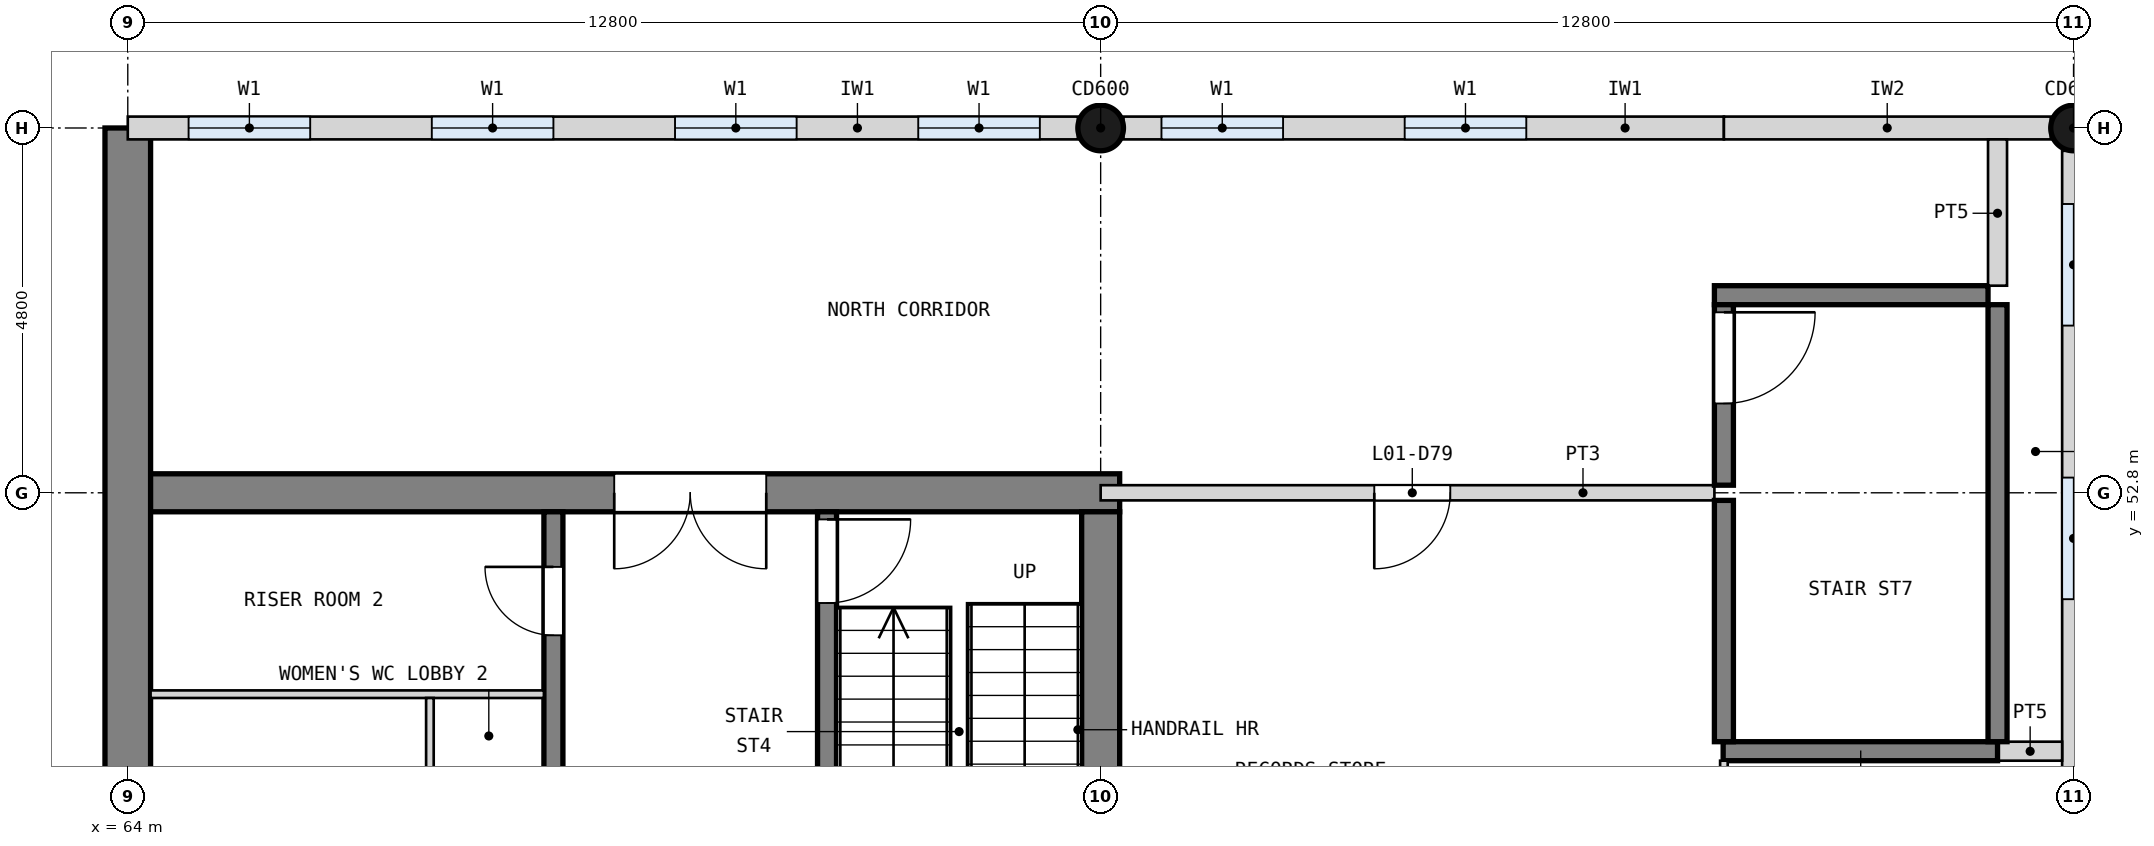
"""IFC4 building model, lengths in metres.
Left out: names, types, materials, properties, quantities, classifications, styles, units other than length and angle.
Written with IfcOpenShell. Run it as: python <this file> out.ifc"""

import sys

from ifc_helpers import new_model, si_unit, direction, frame, frame_2d, origin, origin_2d, place, context, subcontext, project, spatial, rectangle, circle, extrude, element, fill, save


model = new_model("IFC4")
c1 = context("Model", 3, precision=1e-05, world=origin(), true_north=direction((0.0, 1.0)))
c2 = subcontext(c1, "Body", "Model", "MODEL_VIEW")
j1 = project(units=[si_unit("LENGTHUNIT", "METRE"), si_unit("PLANEANGLEUNIT", "RADIAN")], contexts=[c1])
p1 = place(None, origin())
s1 = spatial("IfcSite", under=j1, at=p1, CompositionType="ELEMENT")
p2 = place(p1, origin())
s2 = spatial("IfcBuilding", under=s1, at=p2, CompositionType="ELEMENT")
p3 = place(p2, frame((0.0, 0.0, 4.2)))
s3 = spatial("IfcBuildingStorey", under=s2, at=p3, CompositionType="ELEMENT", Elevation=4.2)
p4 = place(p3, frame((63.75, 52.8, 0.0), z_axis=(0.0, 0.0, 1.0), x_axis=(1.0, 0.0, 0.0)))
e1 = element("IfcWall", 1, at=p4, inside=s3, PredefinedType="SHEAR", context=c2, shape_type="SweptSolid", body=[
    extrude(rectangle(XDim=13.3, YDim=0.5, at=frame_2d((6.65, 0.0))), origin(), (0.0, 0.0, 1.0), 4.2),
])
p5 = place(p4, frame((6.65, 0.0, 0.0)))
e2 = element("IfcOpeningElement", 2, at=p5, cuts=e1, PredefinedType="OPENING", context=c2, shape_type="SweptSolid", body=[
    extrude(rectangle(XDim=2.0, YDim=2.1, at=frame_2d((1.0, 1.05))), frame((0.0, 0.26, 0.0), z_axis=(0.0, -1.0, 0.0), x_axis=(1.0, 0.0, 0.0)), (0.0, 0.0, 1.0), 0.52),
])
p6 = place(p3, frame((76.8, 33.85, 0.0), z_axis=(0.0, 0.0, 1.0), x_axis=(0.0, 1.0, 0.0)))
e3 = element("IfcWall", 3, at=p6, inside=s3, PredefinedType="SHEAR", context=c2, shape_type="SweptSolid", body=[
    extrude(rectangle(XDim=18.7, YDim=0.5, at=frame_2d((9.35, 0.0))), origin(), (0.0, 0.0, 1.0), 4.2),
])
p7 = place(p3, frame((64.0, 28.8, 0.0), z_axis=(0.0, 0.0, 1.0), x_axis=(0.0, 1.0, 0.0)))
e4 = element("IfcWall", 4, at=p7, inside=s3, PredefinedType="SHEAR", context=c2, shape_type="SweptSolid", body=[
    extrude(rectangle(XDim=28.8, YDim=0.6, at=frame_2d((14.4, 0.0))), origin(), (0.0, 0.0, 1.0), 4.2),
])
for number, where, z_axis, x_axis in (
    (5, (89.6, 57.6, 0.0), (0.0, 0.0, 1.0), (1.0, 0.0, 0.0)),
    (6, (76.8, 57.6, 0.0), (0.0, 0.0, 1.0), (1.0, 0.0, 0.0)),
):
    element("IfcColumn", number, at=place(p3, frame(where, z_axis=z_axis, x_axis=x_axis)), inside=s3, PredefinedType="COLUMN", context=c2, shape_type="SweptSolid", body=[
        extrude(circle(Radius=0.3, at=origin_2d()), origin(), (0.0, 0.0, 1.0), 4.2),
    ])
p8 = place(p3, frame((64.0, 57.6, 0.0), z_axis=(0.0, 0.0, 1.0), x_axis=(1.0, 0.0, 0.0)))
e7 = element("IfcWall", 7, at=p8, inside=s3, PredefinedType="SOLIDWALL", context=c2, shape_type="SweptSolid", body=[
    extrude(rectangle(XDim=12.5, YDim=0.3, at=frame_2d((6.25, 0.0))), origin(), (0.0, 0.0, 1.0), 3.0),
])
p9 = place(p8, frame((0.8, 0.0, 1.0)))
e8 = element("IfcOpeningElement", 8, at=p9, cuts=e7, PredefinedType="OPENING", context=c2, shape_type="SweptSolid", body=[
    extrude(rectangle(XDim=1.6, YDim=1.8, at=frame_2d((0.8, 0.9))), frame((0.0, 0.16, 0.0), z_axis=(0.0, -1.0, 0.0), x_axis=(1.0, 0.0, 0.0)), (0.0, 0.0, 1.0), 0.32),
])
p10 = place(p8, frame((4.0, 0.0, 1.0)))
e9 = element("IfcOpeningElement", 9, at=p10, cuts=e7, PredefinedType="OPENING", context=c2, shape_type="SweptSolid", body=[
    extrude(rectangle(XDim=1.6, YDim=1.8, at=frame_2d((0.8, 0.9))), frame((0.0, 0.16, 0.0), z_axis=(0.0, -1.0, 0.0), x_axis=(1.0, 0.0, 0.0)), (0.0, 0.0, 1.0), 0.32),
])
p11 = place(p8, frame((7.2, 0.0, 1.0)))
e10 = element("IfcOpeningElement", 10, at=p11, cuts=e7, PredefinedType="OPENING", context=c2, shape_type="SweptSolid", body=[
    extrude(rectangle(XDim=1.6, YDim=1.8, at=frame_2d((0.8, 0.9))), frame((0.0, 0.16, 0.0), z_axis=(0.0, -1.0, 0.0), x_axis=(1.0, 0.0, 0.0)), (0.0, 0.0, 1.0), 0.32),
])
p12 = place(p8, frame((10.4, 0.0, 1.0)))
e11 = element("IfcOpeningElement", 11, at=p12, cuts=e7, PredefinedType="OPENING", context=c2, shape_type="SweptSolid", body=[
    extrude(rectangle(XDim=1.6, YDim=1.8, at=frame_2d((0.8, 0.9))), frame((0.0, 0.16, 0.0), z_axis=(0.0, -1.0, 0.0), x_axis=(1.0, 0.0, 0.0)), (0.0, 0.0, 1.0), 0.32),
])
p13 = place(p3, frame((77.1, 57.6, 0.0), z_axis=(0.0, 0.0, 1.0), x_axis=(1.0, 0.0, 0.0)))
e12 = element("IfcWall", 12, at=p13, inside=s3, PredefinedType="SOLIDWALL", context=c2, shape_type="SweptSolid", body=[
    extrude(rectangle(XDim=7.9, YDim=0.3, at=frame_2d((3.95, 0.0))), origin(), (0.0, 0.0, 1.0), 3.0),
])
p14 = place(p13, frame((0.5, 0.0, 1.0)))
e13 = element("IfcOpeningElement", 13, at=p14, cuts=e12, PredefinedType="OPENING", context=c2, shape_type="SweptSolid", body=[
    extrude(rectangle(XDim=1.6, YDim=1.8, at=frame_2d((0.8, 0.9))), frame((0.0, 0.16, 0.0), z_axis=(0.0, -1.0, 0.0), x_axis=(1.0, 0.0, 0.0)), (0.0, 0.0, 1.0), 0.32),
])
p15 = place(p13, frame((3.7, 0.0, 1.0)))
e14 = element("IfcOpeningElement", 14, at=p15, cuts=e12, PredefinedType="OPENING", context=c2, shape_type="SweptSolid", body=[
    extrude(rectangle(XDim=1.6, YDim=1.8, at=frame_2d((0.8, 0.9))), frame((0.0, 0.16, 0.0), z_axis=(0.0, -1.0, 0.0), x_axis=(1.0, 0.0, 0.0)), (0.0, 0.0, 1.0), 0.32),
])
p16 = place(p3, frame((85.0, 57.6, 0.0), z_axis=(0.0, 0.0, 1.0), x_axis=(1.0, 0.0, 0.0)))
e15 = element("IfcWall", 15, at=p16, inside=s3, PredefinedType="SOLIDWALL", context=c2, shape_type="SweptSolid", body=[
    extrude(rectangle(XDim=4.3, YDim=0.3, at=frame_2d((2.15, 0.0))), origin(), (0.0, 0.0, 1.0), 3.0),
])
p17 = place(p3, frame((89.6, 43.5, 0.0), z_axis=(0.0, 0.0, 1.0), x_axis=(0.0, 1.0, 0.0)))
e16 = element("IfcWall", 16, at=p17, inside=s3, PredefinedType="SOLIDWALL", context=c2, shape_type="SweptSolid", body=[
    extrude(rectangle(XDim=13.8, YDim=0.3, at=frame_2d((6.9, 0.0))), origin(), (0.0, 0.0, 1.0), 2.9),
])
p18 = place(p17, frame((0.7, 0.0, 1.0)))
e17 = element("IfcOpeningElement", 17, at=p18, cuts=e16, PredefinedType="OPENING", context=c2, shape_type="SweptSolid", body=[
    extrude(rectangle(XDim=1.6, YDim=1.8, at=frame_2d((0.8, 0.9))), frame((0.0, 0.16, 0.0), z_axis=(0.0, -1.0, 0.0), x_axis=(1.0, 0.0, 0.0)), (0.0, 0.0, 1.0), 0.32),
])
p19 = place(p17, frame((7.9, 0.0, 1.0)))
e18 = element("IfcOpeningElement", 18, at=p19, cuts=e16, PredefinedType="OPENING", context=c2, shape_type="SweptSolid", body=[
    extrude(rectangle(XDim=1.6, YDim=1.8, at=frame_2d((0.8, 0.9))), frame((0.0, 0.16, 0.0), z_axis=(0.0, -1.0, 0.0), x_axis=(1.0, 0.0, 0.0)), (0.0, 0.0, 1.0), 0.32),
])
p20 = place(p17, frame((11.5, 0.0, 1.0)))
e19 = element("IfcOpeningElement", 19, at=p20, cuts=e16, PredefinedType="OPENING", context=c2, shape_type="SweptSolid", body=[
    extrude(rectangle(XDim=1.6, YDim=1.8, at=frame_2d((0.8, 0.9))), frame((0.0, 0.16, 0.0), z_axis=(0.0, -1.0, 0.0), x_axis=(1.0, 0.0, 0.0)), (0.0, 0.0, 1.0), 0.32),
])
p21 = place(p3, frame((73.2, 46.475, 0.0), z_axis=(0.0, 0.0, 1.0), x_axis=(0.0, 1.0, 0.0)))
e20 = element("IfcWall", 20, at=p21, inside=s3, PredefinedType="SOLIDWALL", context=c2, shape_type="SweptSolid", body=[
    extrude(rectangle(XDim=6.075, YDim=0.25, at=frame_2d((3.038, 0.0))), origin(), (0.0, 0.0, 1.0), 3.9),
])
p22 = place(p21, frame((4.875, 0.0, 0.0)))
e21 = element("IfcOpeningElement", 21, at=p22, cuts=e20, PredefinedType="OPENING", context=c2, shape_type="SweptSolid", body=[
    extrude(rectangle(XDim=1.1, YDim=2.1, at=frame_2d((0.55, 1.05))), frame((0.0, 0.135, 0.0), z_axis=(0.0, -1.0, 0.0), x_axis=(1.0, 0.0, 0.0)), (0.0, 0.0, 1.0), 0.27),
])
p23 = place(p3, frame((69.6, 46.475, 0.0), z_axis=(0.0, 0.0, 1.0), x_axis=(0.0, 1.0, 0.0)))
e22 = element("IfcWall", 22, at=p23, inside=s3, PredefinedType="SOLIDWALL", context=c2, shape_type="SweptSolid", body=[
    extrude(rectangle(XDim=6.075, YDim=0.25, at=frame_2d((3.038, 0.0))), origin(), (0.0, 0.0, 1.0), 3.9),
])
p24 = place(p23, frame((1.312, 0.0, 0.0)))
e23 = element("IfcOpeningElement", 23, at=p24, cuts=e22, PredefinedType="OPENING", context=c2, shape_type="SweptSolid", body=[
    extrude(rectangle(XDim=1.0, YDim=2.1, at=frame_2d((0.5, 1.05))), frame((0.0, 0.135, 0.0), z_axis=(0.0, -1.0, 0.0), x_axis=(1.0, 0.0, 0.0)), (0.0, 0.0, 1.0), 0.27),
])
p25 = place(p23, frame((4.45, 0.0, 0.0)))
e24 = element("IfcOpeningElement", 24, at=p25, cuts=e22, PredefinedType="OPENING", context=c2, shape_type="SweptSolid", body=[
    extrude(rectangle(XDim=0.9, YDim=2.1, at=frame_2d((0.45, 1.05))), frame((0.0, 0.135, 0.0), z_axis=(0.0, -1.0, 0.0), x_axis=(1.0, 0.0, 0.0)), (0.0, 0.0, 1.0), 0.27),
])
p26 = place(p3, frame((69.475, 50.15, 0.0), z_axis=(0.0, 0.0, 1.0), x_axis=(-1.0, 0.0, 0.0)))
e25 = element("IfcWall", 25, at=p26, inside=s3, PredefinedType="PARTITIONING", context=c2, shape_type="SweptSolid", body=[
    extrude(rectangle(XDim=5.175, YDim=0.1, at=frame_2d((2.587, 0.0))), origin(), (0.0, 0.0, 1.0), 3.9),
])
p27 = place(p3, frame((67.975, 46.475, 0.0), z_axis=(0.0, 0.0, 1.0), x_axis=(0.0, 1.0, 0.0)))
e26 = element("IfcWall", 26, at=p27, inside=s3, PredefinedType="PARTITIONING", context=c2, shape_type="SweptSolid", body=[
    extrude(rectangle(XDim=3.625, YDim=0.1, at=frame_2d((1.812, 0.0))), origin(), (0.0, 0.0, 1.0), 3.9),
])
p28 = place(p27, frame((1.363, 0.0, 0.0)))
e27 = element("IfcOpeningElement", 27, at=p28, cuts=e26, PredefinedType="OPENING", context=c2, shape_type="SweptSolid", body=[
    extrude(rectangle(XDim=0.9, YDim=2.1, at=frame_2d((0.45, 1.05))), frame((0.0, 0.06, 0.0), z_axis=(0.0, -1.0, 0.0), x_axis=(1.0, 0.0, 0.0)), (0.0, 0.0, 1.0), 0.12),
])
p29 = place(p3, frame((89.45, 49.4, 0.0), z_axis=(0.0, 0.0, 1.0), x_axis=(-1.0, 0.0, 0.0)))
e28 = element("IfcWall", 28, at=p29, inside=s3, PredefinedType="PARTITIONING", context=c2, shape_type="SweptSolid", body=[
    extrude(rectangle(XDim=0.85, YDim=0.25, at=frame_2d((0.425, 0.0))), origin(), (0.0, 0.0, 1.0), 3.9),
])
p30 = place(p3, frame((88.6, 49.4, 0.0), z_axis=(0.0, 0.0, 1.0), x_axis=(-1.0, 0.0, 0.0)))
e29 = element("IfcWall", 29, at=p30, inside=s3, PredefinedType="SHEAR", context=c2, shape_type="SweptSolid", body=[
    extrude(rectangle(XDim=3.61, YDim=0.25, at=frame_2d((1.805, 0.0))), origin(), (0.0, 0.0, 1.0), 3.9),
])
p31 = place(p3, frame((84.875, 52.8, 0.0), z_axis=(0.0, 0.0, 1.0), x_axis=(-1.0, 0.0, 0.0)))
e30 = element("IfcWall", 30, at=p31, inside=s3, PredefinedType="PARTITIONING", context=c2, shape_type="SweptSolid", body=[
    extrude(rectangle(XDim=8.075, YDim=0.2, at=frame_2d((4.038, 0.0))), origin(), (0.0, 0.0, 1.0), 3.9),
])
p32 = place(p31, frame((3.475, 0.0, 0.0)))
e31 = element("IfcOpeningElement", 31, at=p32, cuts=e30, PredefinedType="OPENING", context=c2, shape_type="SweptSolid", body=[
    extrude(rectangle(XDim=1.0, YDim=2.1, at=frame_2d((0.5, 1.05))), frame((0.0, 0.11, 0.0), z_axis=(0.0, -1.0, 0.0), x_axis=(1.0, 0.0, 0.0)), (0.0, 0.0, 1.0), 0.22),
])
p33 = place(p3, frame((88.475, 55.4, 0.0), z_axis=(0.0, 0.0, 1.0), x_axis=(-1.0, 0.0, 0.0)))
e32 = element("IfcWall", 32, at=p33, inside=s3, PredefinedType="SHEAR", context=c2, shape_type="SweptSolid", body=[
    extrude(rectangle(XDim=3.6, YDim=0.25, at=frame_2d((1.8, 0.0))), origin(), (0.0, 0.0, 1.0), 3.9),
])
p34 = place(p3, frame((88.6, 49.525, 0.0), z_axis=(0.0, 0.0, 1.0), x_axis=(0.0, 1.0, 0.0)))
e33 = element("IfcWall", 33, at=p34, inside=s3, PredefinedType="SHEAR", context=c2, shape_type="SweptSolid", body=[
    extrude(rectangle(XDim=5.75, YDim=0.25, at=frame_2d((2.875, 0.0))), origin(), (0.0, 0.0, 1.0), 3.9),
])
p35 = place(p3, frame((88.6, 55.525, 0.0), z_axis=(0.0, 0.0, 1.0), x_axis=(0.0, 1.0, 0.0)))
e34 = element("IfcWall", 34, at=p35, inside=s3, PredefinedType="PARTITIONING", context=c2, shape_type="SweptSolid", body=[
    extrude(rectangle(XDim=1.925, YDim=0.25, at=frame_2d((0.962, 0.0))), origin(), (0.0, 0.0, 1.0), 3.9),
])
p36 = place(p3, frame((85.0, 46.45, 0.0), z_axis=(0.0, 0.0, 1.0), x_axis=(0.0, 1.0, 0.0)))
e35 = element("IfcWall", 35, at=p36, inside=s3, PredefinedType="PARTITIONING", context=c2, shape_type="SweptSolid", body=[
    extrude(rectangle(XDim=2.825, YDim=0.1, at=frame_2d((1.413, 0.0))), origin(), (0.0, 0.0, 1.0), 3.9),
])
p37 = place(p3, frame((85.0, 49.525, 0.0), z_axis=(0.0, 0.0, 1.0), x_axis=(0.0, 1.0, 0.0)))
e36 = element("IfcWall", 36, at=p37, inside=s3, PredefinedType="SHEAR", context=c2, shape_type="SweptSolid", body=[
    extrude(rectangle(XDim=3.175, YDim=0.25, at=frame_2d((1.587, 0.0))), origin(), (0.0, 0.0, 1.0), 3.9),
])
p38 = place(p3, frame((85.0, 52.9, 0.0), z_axis=(0.0, 0.0, 1.0), x_axis=(0.0, 1.0, 0.0)))
e37 = element("IfcWall", 37, at=p38, inside=s3, PredefinedType="SHEAR", context=c2, shape_type="SweptSolid", body=[
    extrude(rectangle(XDim=2.375, YDim=0.25, at=frame_2d((1.188, 0.0))), origin(), (0.0, 0.0, 1.0), 3.9),
])
p39 = place(p38, frame((1.075, 0.0, 0.0)))
e38 = element("IfcOpeningElement", 38, at=p39, cuts=e37, PredefinedType="OPENING", context=c2, shape_type="SweptSolid", body=[
    extrude(rectangle(XDim=1.2, YDim=2.1, at=frame_2d((0.6, 1.05))), frame((0.0, 0.135, 0.0), z_axis=(0.0, -1.0, 0.0), x_axis=(1.0, 0.0, 0.0)), (0.0, 0.0, 1.0), 0.27),
])
p40 = place(p22, frame((1.1, 0.0, 0.0), z_axis=(0.0, 0.0, 1.0), x_axis=(-1.0, 0.0, 0.0)))
e39 = element("IfcDoor", 39, at=p40, inside=s3, OperationType="SINGLE_SWING_LEFT", PredefinedType="DOOR", context=c2, shape_type="SweptSolid", body=[
    extrude(rectangle(XDim=1.1, YDim=2.1, at=frame_2d((0.55, 1.05))), frame((0.0, 0.025, 0.0), z_axis=(0.0, -1.0, 0.0), x_axis=(1.0, 0.0, 0.0)), (0.0, 0.0, 1.0), 0.05),
])
fill(e21, e39)
p41 = place(p25, origin())
e40 = element("IfcDoor", 40, at=p41, inside=s3, OperationType="SINGLE_SWING_RIGHT", PredefinedType="DOOR", context=c2, shape_type="SweptSolid", body=[
    extrude(rectangle(XDim=0.9, YDim=2.1, at=frame_2d((0.45, 1.05))), frame((0.0, 0.025, 0.0), z_axis=(0.0, -1.0, 0.0), x_axis=(1.0, 0.0, 0.0)), (0.0, 0.0, 1.0), 0.05),
])
fill(e24, e40)
p42 = place(p5, frame((2.0, 0.0, 0.0), z_axis=(0.0, 0.0, 1.0), x_axis=(-1.0, 0.0, 0.0)))
e41 = element("IfcDoor", 41, at=p42, inside=s3, OperationType="DOUBLE_DOOR_SINGLE_SWING", PredefinedType="DOOR", context=c2, shape_type="SweptSolid", body=[
    extrude(rectangle(XDim=2.0, YDim=2.1, at=frame_2d((1.0, 1.05))), frame((0.0, 0.025, 0.0), z_axis=(0.0, -1.0, 0.0), x_axis=(1.0, 0.0, 0.0)), (0.0, 0.0, 1.0), 0.05),
])
fill(e2, e41)
p43 = place(p32, origin())
e42 = element("IfcDoor", 42, at=p43, inside=s3, OperationType="SINGLE_SWING_RIGHT", PredefinedType="DOOR", context=c2, shape_type="SweptSolid", body=[
    extrude(rectangle(XDim=1.0, YDim=2.1, at=frame_2d((0.5, 1.05))), frame((0.0, 0.025, 0.0), z_axis=(0.0, -1.0, 0.0), x_axis=(1.0, 0.0, 0.0)), (0.0, 0.0, 1.0), 0.05),
])
fill(e31, e42)
p44 = place(p39, frame((1.2, 0.0, 0.0), z_axis=(0.0, 0.0, 1.0), x_axis=(-1.0, 0.0, 0.0)))
e43 = element("IfcDoor", 43, at=p44, inside=s3, OperationType="SINGLE_SWING_LEFT", PredefinedType="DOOR", context=c2, shape_type="SweptSolid", body=[
    extrude(rectangle(XDim=1.2, YDim=2.1, at=frame_2d((0.6, 1.05))), frame((0.0, 0.025, 0.0), z_axis=(0.0, -1.0, 0.0), x_axis=(1.0, 0.0, 0.0)), (0.0, 0.0, 1.0), 0.05),
])
fill(e38, e43)
p45 = place(p9, origin())
e44 = element("IfcWindow", 44, at=p45, inside=s3, PartitioningType="SINGLE_PANEL", PredefinedType="WINDOW", context=c2, shape_type="SweptSolid", body=[
    extrude(rectangle(XDim=1.6, YDim=1.8, at=frame_2d((0.8, 0.9))), frame((0.0, 0.03, 0.0), z_axis=(0.0, -1.0, 0.0), x_axis=(1.0, 0.0, 0.0)), (0.0, 0.0, 1.0), 0.06),
])
fill(e8, e44)
p46 = place(p10, origin())
e45 = element("IfcWindow", 45, at=p46, inside=s3, PartitioningType="SINGLE_PANEL", PredefinedType="WINDOW", context=c2, shape_type="SweptSolid", body=[
    extrude(rectangle(XDim=1.6, YDim=1.8, at=frame_2d((0.8, 0.9))), frame((0.0, 0.03, 0.0), z_axis=(0.0, -1.0, 0.0), x_axis=(1.0, 0.0, 0.0)), (0.0, 0.0, 1.0), 0.06),
])
fill(e9, e45)
p47 = place(p11, origin())
e46 = element("IfcWindow", 46, at=p47, inside=s3, PartitioningType="SINGLE_PANEL", PredefinedType="WINDOW", context=c2, shape_type="SweptSolid", body=[
    extrude(rectangle(XDim=1.6, YDim=1.8, at=frame_2d((0.8, 0.9))), frame((0.0, 0.03, 0.0), z_axis=(0.0, -1.0, 0.0), x_axis=(1.0, 0.0, 0.0)), (0.0, 0.0, 1.0), 0.06),
])
fill(e10, e46)
p48 = place(p12, origin())
e47 = element("IfcWindow", 47, at=p48, inside=s3, PartitioningType="SINGLE_PANEL", PredefinedType="WINDOW", context=c2, shape_type="SweptSolid", body=[
    extrude(rectangle(XDim=1.6, YDim=1.8, at=frame_2d((0.8, 0.9))), frame((0.0, 0.03, 0.0), z_axis=(0.0, -1.0, 0.0), x_axis=(1.0, 0.0, 0.0)), (0.0, 0.0, 1.0), 0.06),
])
fill(e11, e47)
p49 = place(p14, origin())
e48 = element("IfcWindow", 48, at=p49, inside=s3, PartitioningType="SINGLE_PANEL", PredefinedType="WINDOW", context=c2, shape_type="SweptSolid", body=[
    extrude(rectangle(XDim=1.6, YDim=1.8, at=frame_2d((0.8, 0.9))), frame((0.0, 0.03, 0.0), z_axis=(0.0, -1.0, 0.0), x_axis=(1.0, 0.0, 0.0)), (0.0, 0.0, 1.0), 0.06),
])
fill(e13, e48)
p50 = place(p15, origin())
e49 = element("IfcWindow", 49, at=p50, inside=s3, PartitioningType="SINGLE_PANEL", PredefinedType="WINDOW", context=c2, shape_type="SweptSolid", body=[
    extrude(rectangle(XDim=1.6, YDim=1.8, at=frame_2d((0.8, 0.9))), frame((0.0, 0.03, 0.0), z_axis=(0.0, -1.0, 0.0), x_axis=(1.0, 0.0, 0.0)), (0.0, 0.0, 1.0), 0.06),
])
fill(e14, e49)
p51 = place(p19, origin())
e50 = element("IfcWindow", 50, at=p51, inside=s3, PartitioningType="SINGLE_PANEL", PredefinedType="WINDOW", context=c2, shape_type="SweptSolid", body=[
    extrude(rectangle(XDim=1.6, YDim=1.8, at=frame_2d((0.8, 0.9))), frame((0.0, 0.03, 0.0), z_axis=(0.0, -1.0, 0.0), x_axis=(1.0, 0.0, 0.0)), (0.0, 0.0, 1.0), 0.06),
])
fill(e18, e50)
p52 = place(p20, origin())
e51 = element("IfcWindow", 51, at=p52, inside=s3, PartitioningType="SINGLE_PANEL", PredefinedType="WINDOW", context=c2, shape_type="SweptSolid", body=[
    extrude(rectangle(XDim=1.6, YDim=1.8, at=frame_2d((0.8, 0.9))), frame((0.0, 0.03, 0.0), z_axis=(0.0, -1.0, 0.0), x_axis=(1.0, 0.0, 0.0)), (0.0, 0.0, 1.0), 0.06),
])
fill(e19, e51)
save(model, sys.argv[1])
